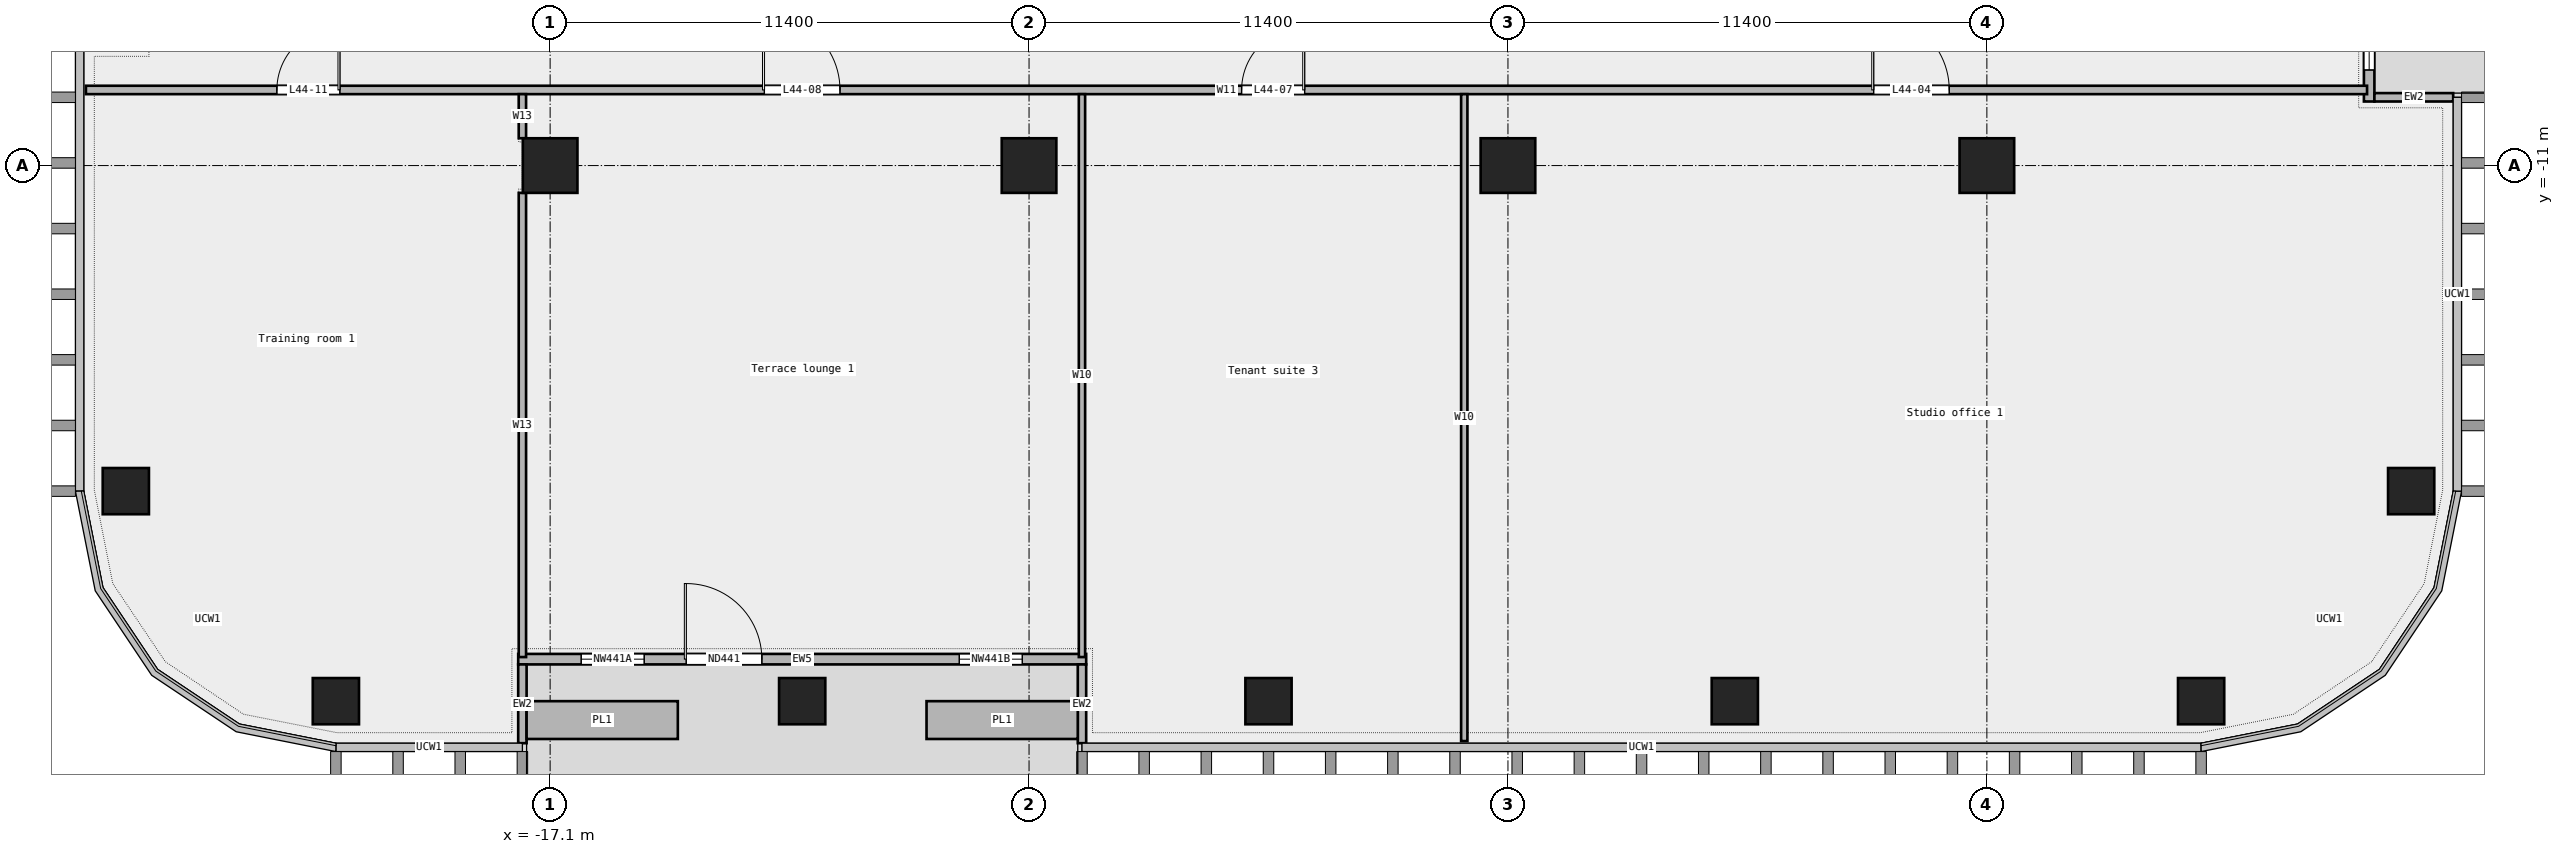
"""IFC4 building model, lengths in metres.
Left out: names, types, materials, properties, quantities, classifications, styles, units other than length and angle.
Written with IfcOpenShell. Run it as: python <this file> out.ifc"""

import sys

from ifc_helpers import new_model, si_unit, direction, frame, frame_2d, origin, origin_2d, place, context, subcontext, project, spatial, rectangle, extrude, element, fill, save


model = new_model("IFC4")
c1 = context("Model", 3, precision=1e-05, world=origin(), true_north=direction((0.0, 1.0)))
c2 = subcontext(c1, "Body", "Model", "MODEL_VIEW")
j1 = project(units=[si_unit("LENGTHUNIT", "METRE"), si_unit("PLANEANGLEUNIT", "RADIAN")], contexts=[c1])
p1 = place(None, origin())
s1 = spatial("IfcSite", under=j1, at=p1, CompositionType="ELEMENT")
p2 = place(p1, origin())
s2 = spatial("IfcBuilding", under=s1, at=p2, CompositionType="ELEMENT")
p3 = place(p2, frame((0.0, 0.0, 211.0)))
s3 = spatial("IfcBuildingStorey", under=s2, at=p3, CompositionType="ELEMENT", Elevation=211.0)
for number, where, z_axis, x_axis in (
    (1, (-22.2, -23.75, 0.0), (0.0, 0.0, 1.0), (1.0, 0.0, 0.0)),
    (2, (-11.1, -23.75, 0.0), (0.0, 0.0, 1.0), (1.0, 0.0, 0.0)),
    (3, (0.0, -23.75, 0.0), (0.0, 0.0, 1.0), (1.0, 0.0, 0.0)),
    (4, (11.1, -23.75, 0.0), (0.0, 0.0, 1.0), (1.0, 0.0, 0.0)),
    (5, (22.2, -23.75, 0.0), (0.0, 0.0, 1.0), (1.0, 0.0, 0.0)),
    (6, (27.2, -18.75, 0.0), (0.0, 0.0, 1.0), (1.0, 0.0, 0.0)),
    (7, (-27.2, -18.75, 0.0), (0.0, 0.0, 1.0), (1.0, 0.0, 0.0)),
):
    element("IfcColumn", number, at=place(p3, frame(where, z_axis=z_axis, x_axis=x_axis)), inside=s3, PredefinedType="COLUMN", context=c2, shape_type="SweptSolid", body=[
        extrude(rectangle(XDim=1.1, YDim=1.1, at=origin_2d()), origin(), (0.0, 0.0, 1.0), 3.6),
    ])
for number, where, z_axis, x_axis in (
    (8, (-17.1, -11.0, 0.0), (0.0, 0.0, 1.0), (1.0, 0.0, 0.0)),
    (9, (-5.7, -11.0, 0.0), (0.0, 0.0, 1.0), (1.0, 0.0, 0.0)),
    (10, (5.7, -11.0, 0.0), (0.0, 0.0, 1.0), (1.0, 0.0, 0.0)),
    (11, (17.1, -11.0, 0.0), (0.0, 0.0, 1.0), (1.0, 0.0, 0.0)),
):
    element("IfcColumn", number, at=place(p3, frame(where, z_axis=z_axis, x_axis=x_axis)), inside=s3, PredefinedType="COLUMN", context=c2, shape_type="SweptSolid", body=[
        extrude(rectangle(XDim=1.3, YDim=1.3, at=origin_2d()), origin(), (0.0, 0.0, 1.0), 3.6),
    ])
p4 = place(p3, frame((-17.86, -22.75, 0.0), z_axis=(0.0, 0.0, 1.0), x_axis=(1.0, 0.0, 0.0)))
e12 = element("IfcWall", 12, at=p4, inside=s3, PredefinedType="STANDARD", context=c2, shape_type="SweptSolid", body=[
    extrude(rectangle(XDim=13.52, YDim=0.25, at=frame_2d((6.76, 0.0))), origin(), (0.0, 0.0, 1.0), 3.6),
])
p5 = place(p4, frame((1.5, 0.0, 0.45)))
e13 = element("IfcOpeningElement", 13, at=p5, cuts=e12, PredefinedType="OPENING", context=c2, shape_type="SweptSolid", body=[
    extrude(rectangle(XDim=1.5, YDim=2.4, at=frame_2d((0.75, 1.2))), frame((0.0, 0.137, 0.0), z_axis=(0.0, -1.0, 0.0), x_axis=(1.0, 0.0, 0.0)), (0.0, 0.0, 1.0), 0.274),
])
p6 = place(p4, frame((4.0, 0.0, 0.0)))
e14 = element("IfcOpeningElement", 14, at=p6, cuts=e12, PredefinedType="OPENING", context=c2, shape_type="SweptSolid", body=[
    extrude(rectangle(XDim=1.8, YDim=2.4, at=frame_2d((0.9, 1.2))), frame((0.0, 0.137, 0.0), z_axis=(0.0, -1.0, 0.0), x_axis=(1.0, 0.0, 0.0)), (0.0, 0.0, 1.0), 0.274),
])
p7 = place(p4, frame((10.5, 0.0, 0.45)))
e15 = element("IfcOpeningElement", 15, at=p7, cuts=e12, PredefinedType="OPENING", context=c2, shape_type="SweptSolid", body=[
    extrude(rectangle(XDim=1.5, YDim=2.4, at=frame_2d((0.75, 1.2))), frame((0.0, 0.137, 0.0), z_axis=(0.0, -1.0, 0.0), x_axis=(1.0, 0.0, 0.0)), (0.0, 0.0, 1.0), 0.274),
])
for number, where, z_axis, x_axis in (
    (16, (-17.76, -24.75, 0.0), (0.0, 0.0, 1.0), (0.0, 1.0, 0.0)),
    (17, (-4.44, -24.75, 0.0), (0.0, 0.0, 1.0), (0.0, 1.0, 0.0)),
):
    element("IfcWall", number, at=place(p3, frame(where, z_axis=z_axis, x_axis=x_axis)), inside=s3, PredefinedType="STANDARD", context=c2, shape_type="SweptSolid", body=[
        extrude(rectangle(XDim=1.875, YDim=0.2, at=frame_2d((0.938, 0.0))), origin(), (0.0, 0.0, 1.0), 3.6),
    ])
for number, where, z_axis, x_axis in (
    (18, (-17.66, -24.2, 0.0), (0.0, 0.0, 1.0), (1.0, 0.0, 0.0)),
    (19, (-8.14, -24.2, 0.0), (0.0, 0.0, 1.0), (1.0, 0.0, 0.0)),
):
    element("IfcWall", number, at=place(p3, frame(where, z_axis=z_axis, x_axis=x_axis)), inside=s3, PredefinedType="STANDARD", context=c2, shape_type="SweptSolid", body=[
        extrude(rectangle(XDim=3.6, YDim=0.9, at=frame_2d((1.8, 0.0))), origin(), (0.0, 0.0, 1.0), 0.7),
    ])
p8 = place(p3, frame((26.2, -9.475, 0.0), z_axis=(0.0, 0.0, 1.0), x_axis=(0.0, 1.0, 0.0)))
e20 = element("IfcWall", 20, at=p8, inside=s3, PredefinedType="STANDARD", context=c2, shape_type="SweptSolid", body=[
    extrude(rectangle(XDim=14.263, YDim=0.25, at=frame_2d((7.131, 0.0))), origin(), (0.0, 0.0, 1.0), 3.6),
])
p9 = place(p8, frame((0.75, 0.0, 0.45)))
e21 = element("IfcOpeningElement", 21, at=p9, cuts=e20, PredefinedType="OPENING", context=c2, shape_type="SweptSolid", body=[
    extrude(rectangle(XDim=1.5, YDim=2.4, at=frame_2d((0.75, 1.2))), frame((0.0, 0.137, 0.0), z_axis=(0.0, -1.0, 0.0), x_axis=(1.0, 0.0, 0.0)), (0.0, 0.0, 1.0), 0.274),
])
p10 = place(p8, frame((6.25, 0.0, 0.0)))
e22 = element("IfcOpeningElement", 22, at=p10, cuts=e20, PredefinedType="OPENING", context=c2, shape_type="SweptSolid", body=[
    extrude(rectangle(XDim=1.8, YDim=2.4, at=frame_2d((0.9, 1.2))), frame((0.0, 0.137, 0.0), z_axis=(0.0, -1.0, 0.0), x_axis=(1.0, 0.0, 0.0)), (0.0, 0.0, 1.0), 0.274),
])
p11 = place(p8, frame((11.0, 0.0, 0.45)))
e23 = element("IfcOpeningElement", 23, at=p11, cuts=e20, PredefinedType="OPENING", context=c2, shape_type="SweptSolid", body=[
    extrude(rectangle(XDim=1.5, YDim=2.4, at=frame_2d((0.75, 1.2))), frame((0.0, 0.137, 0.0), z_axis=(0.0, -1.0, 0.0), x_axis=(1.0, 0.0, 0.0)), (0.0, 0.0, 1.0), 0.274),
])
p12 = place(p3, frame((28.2, -9.375, 0.0), z_axis=(0.0, 0.0, 1.0), x_axis=(-1.0, 0.0, 0.0)))
e24 = element("IfcWall", 24, at=p12, inside=s3, PredefinedType="STANDARD", context=c2, shape_type="SweptSolid", body=[
    extrude(rectangle(XDim=1.875, YDim=0.2, at=frame_2d((0.938, 0.0))), origin(), (0.0, 0.0, 1.0), 3.6),
])
p13 = place(p3, frame((-28.15, -9.2, 0.0), z_axis=(0.0, 0.0, 1.0), x_axis=(1.0, 0.0, 0.0)))
e25 = element("IfcWall", 25, at=p13, inside=s3, PredefinedType="PARTITIONING", context=c2, shape_type="SweptSolid", body=[
    extrude(rectangle(XDim=54.3, YDim=0.2, at=frame_2d((27.15, 0.0))), origin(), (0.0, 0.0, 1.0), 3.6),
])
p14 = place(p13, frame((42.555, 0.0, 0.0)))
e26 = element("IfcOpeningElement", 26, at=p14, cuts=e25, PredefinedType="OPENING", context=c2, shape_type="SweptSolid", body=[
    extrude(rectangle(XDim=1.8, YDim=2.1, at=frame_2d((0.9, 1.05))), frame((0.0, 0.112, 0.0), z_axis=(0.0, -1.0, 0.0), x_axis=(1.0, 0.0, 0.0)), (0.0, 0.0, 1.0), 0.224),
])
p15 = place(p13, frame((27.51, 0.0, 0.0)))
e27 = element("IfcOpeningElement", 27, at=p15, cuts=e25, PredefinedType="OPENING", context=c2, shape_type="SweptSolid", body=[
    extrude(rectangle(XDim=1.5, YDim=2.1, at=frame_2d((0.75, 1.05))), frame((0.0, 0.112, 0.0), z_axis=(0.0, -1.0, 0.0), x_axis=(1.0, 0.0, 0.0)), (0.0, 0.0, 1.0), 0.224),
])
p16 = place(p13, frame((16.15, 0.0, 0.0)))
e28 = element("IfcOpeningElement", 28, at=p16, cuts=e25, PredefinedType="OPENING", context=c2, shape_type="SweptSolid", body=[
    extrude(rectangle(XDim=1.8, YDim=2.1, at=frame_2d((0.9, 1.05))), frame((0.0, 0.112, 0.0), z_axis=(0.0, -1.0, 0.0), x_axis=(1.0, 0.0, 0.0)), (0.0, 0.0, 1.0), 0.224),
])
p17 = place(p13, frame((4.545, 0.0, 0.0)))
e29 = element("IfcOpeningElement", 29, at=p17, cuts=e25, PredefinedType="OPENING", context=c2, shape_type="SweptSolid", body=[
    extrude(rectangle(XDim=1.5, YDim=2.1, at=frame_2d((0.75, 1.05))), frame((0.0, 0.112, 0.0), z_axis=(0.0, -1.0, 0.0), x_axis=(1.0, 0.0, 0.0)), (0.0, 0.0, 1.0), 0.224),
])
p18 = place(p3, frame((-17.76, -22.7, 0.0), z_axis=(0.0, 0.0, 1.0), x_axis=(0.0, 1.0, 0.0)))
e30 = element("IfcWall", 30, at=p18, inside=s3, PredefinedType="PARTITIONING", context=c2, shape_type="SweptSolid", body=[
    extrude(rectangle(XDim=11.05, YDim=0.175, at=frame_2d((5.525, 0.0))), origin(), (0.0, 0.0, 1.0), 3.6),
])
p19 = place(p3, frame((-17.76, -10.35, 0.0), z_axis=(0.0, 0.0, 1.0), x_axis=(0.0, 1.0, 0.0)))
e31 = element("IfcWall", 31, at=p19, inside=s3, PredefinedType="PARTITIONING", context=c2, shape_type="SweptSolid", body=[
    extrude(rectangle(XDim=1.05, YDim=0.175, at=frame_2d((0.525, 0.0))), origin(), (0.0, 0.0, 1.0), 3.6),
])
p20 = place(p3, frame((-4.44, -22.7, 0.0), z_axis=(0.0, 0.0, 1.0), x_axis=(0.0, 1.0, 0.0)))
e32 = element("IfcWall", 32, at=p20, inside=s3, PredefinedType="PARTITIONING", context=c2, shape_type="SweptSolid", body=[
    extrude(rectangle(XDim=13.4, YDim=0.15, at=frame_2d((6.7, 0.0))), origin(), (0.0, 0.0, 1.0), 3.6),
])
p21 = place(p3, frame((4.66, -24.7, 0.0), z_axis=(0.0, 0.0, 1.0), x_axis=(0.0, 1.0, 0.0)))
e33 = element("IfcWall", 33, at=p21, inside=s3, PredefinedType="PARTITIONING", context=c2, shape_type="SweptSolid", body=[
    extrude(rectangle(XDim=15.4, YDim=0.15, at=frame_2d((7.7, 0.0))), origin(), (0.0, 0.0, 1.0), 3.6),
])
p22 = place(p5, origin())
e34 = element("IfcWindow", 34, at=p22, inside=s3, PartitioningType="SINGLE_PANEL", PredefinedType="WINDOW", context=c2, shape_type="SweptSolid", body=[
    extrude(rectangle(XDim=1.5, YDim=2.4, at=frame_2d((0.75, 1.2))), frame((0.0, 0.03, 0.0), z_axis=(0.0, -1.0, 0.0), x_axis=(1.0, 0.0, 0.0)), (0.0, 0.0, 1.0), 0.06),
])
fill(e13, e34)
p23 = place(p6, origin())
e35 = element("IfcDoor", 35, at=p23, inside=s3, OperationType="DOUBLE_DOOR_SINGLE_SWING", PredefinedType="DOOR", context=c2, shape_type="SweptSolid", body=[
    extrude(rectangle(XDim=1.8, YDim=2.4, at=frame_2d((0.9, 1.2))), frame((0.0, 0.025, 0.0), z_axis=(0.0, -1.0, 0.0), x_axis=(1.0, 0.0, 0.0)), (0.0, 0.0, 1.0), 0.05),
])
fill(e14, e35)
p24 = place(p7, origin())
e36 = element("IfcWindow", 36, at=p24, inside=s3, PartitioningType="SINGLE_PANEL", PredefinedType="WINDOW", context=c2, shape_type="SweptSolid", body=[
    extrude(rectangle(XDim=1.5, YDim=2.4, at=frame_2d((0.75, 1.2))), frame((0.0, 0.03, 0.0), z_axis=(0.0, -1.0, 0.0), x_axis=(1.0, 0.0, 0.0)), (0.0, 0.0, 1.0), 0.06),
])
fill(e15, e36)
p25 = place(p9, origin())
e37 = element("IfcWindow", 37, at=p25, inside=s3, PartitioningType="SINGLE_PANEL", PredefinedType="WINDOW", context=c2, shape_type="SweptSolid", body=[
    extrude(rectangle(XDim=1.5, YDim=2.4, at=frame_2d((0.75, 1.2))), frame((0.0, 0.03, 0.0), z_axis=(0.0, -1.0, 0.0), x_axis=(1.0, 0.0, 0.0)), (0.0, 0.0, 1.0), 0.06),
])
fill(e21, e37)
p26 = place(p14, origin())
e38 = element("IfcDoor", 38, at=p26, inside=s3, OperationType="DOUBLE_DOOR_SINGLE_SWING", PredefinedType="DOOR", context=c2, shape_type="SweptSolid", body=[
    extrude(rectangle(XDim=1.8, YDim=2.1, at=frame_2d((0.9, 1.05))), frame((0.0, 0.025, 0.0), z_axis=(0.0, -1.0, 0.0), x_axis=(1.0, 0.0, 0.0)), (0.0, 0.0, 1.0), 0.05),
])
fill(e26, e38)
p27 = place(p15, origin())
e39 = element("IfcDoor", 39, at=p27, inside=s3, OperationType="DOUBLE_DOOR_SINGLE_SWING", PredefinedType="DOOR", context=c2, shape_type="SweptSolid", body=[
    extrude(rectangle(XDim=1.5, YDim=2.1, at=frame_2d((0.75, 1.05))), frame((0.0, 0.025, 0.0), z_axis=(0.0, -1.0, 0.0), x_axis=(1.0, 0.0, 0.0)), (0.0, 0.0, 1.0), 0.05),
])
fill(e27, e39)
p28 = place(p16, origin())
e40 = element("IfcDoor", 40, at=p28, inside=s3, OperationType="DOUBLE_DOOR_SINGLE_SWING", PredefinedType="DOOR", context=c2, shape_type="SweptSolid", body=[
    extrude(rectangle(XDim=1.8, YDim=2.1, at=frame_2d((0.9, 1.05))), frame((0.0, 0.025, 0.0), z_axis=(0.0, -1.0, 0.0), x_axis=(1.0, 0.0, 0.0)), (0.0, 0.0, 1.0), 0.05),
])
fill(e28, e40)
p29 = place(p17, origin())
e41 = element("IfcDoor", 41, at=p29, inside=s3, OperationType="DOUBLE_DOOR_SINGLE_SWING", PredefinedType="DOOR", context=c2, shape_type="SweptSolid", body=[
    extrude(rectangle(XDim=1.5, YDim=2.1, at=frame_2d((0.75, 1.05))), frame((0.0, 0.025, 0.0), z_axis=(0.0, -1.0, 0.0), x_axis=(1.0, 0.0, 0.0)), (0.0, 0.0, 1.0), 0.05),
])
fill(e29, e41)
save(model, sys.argv[1])
